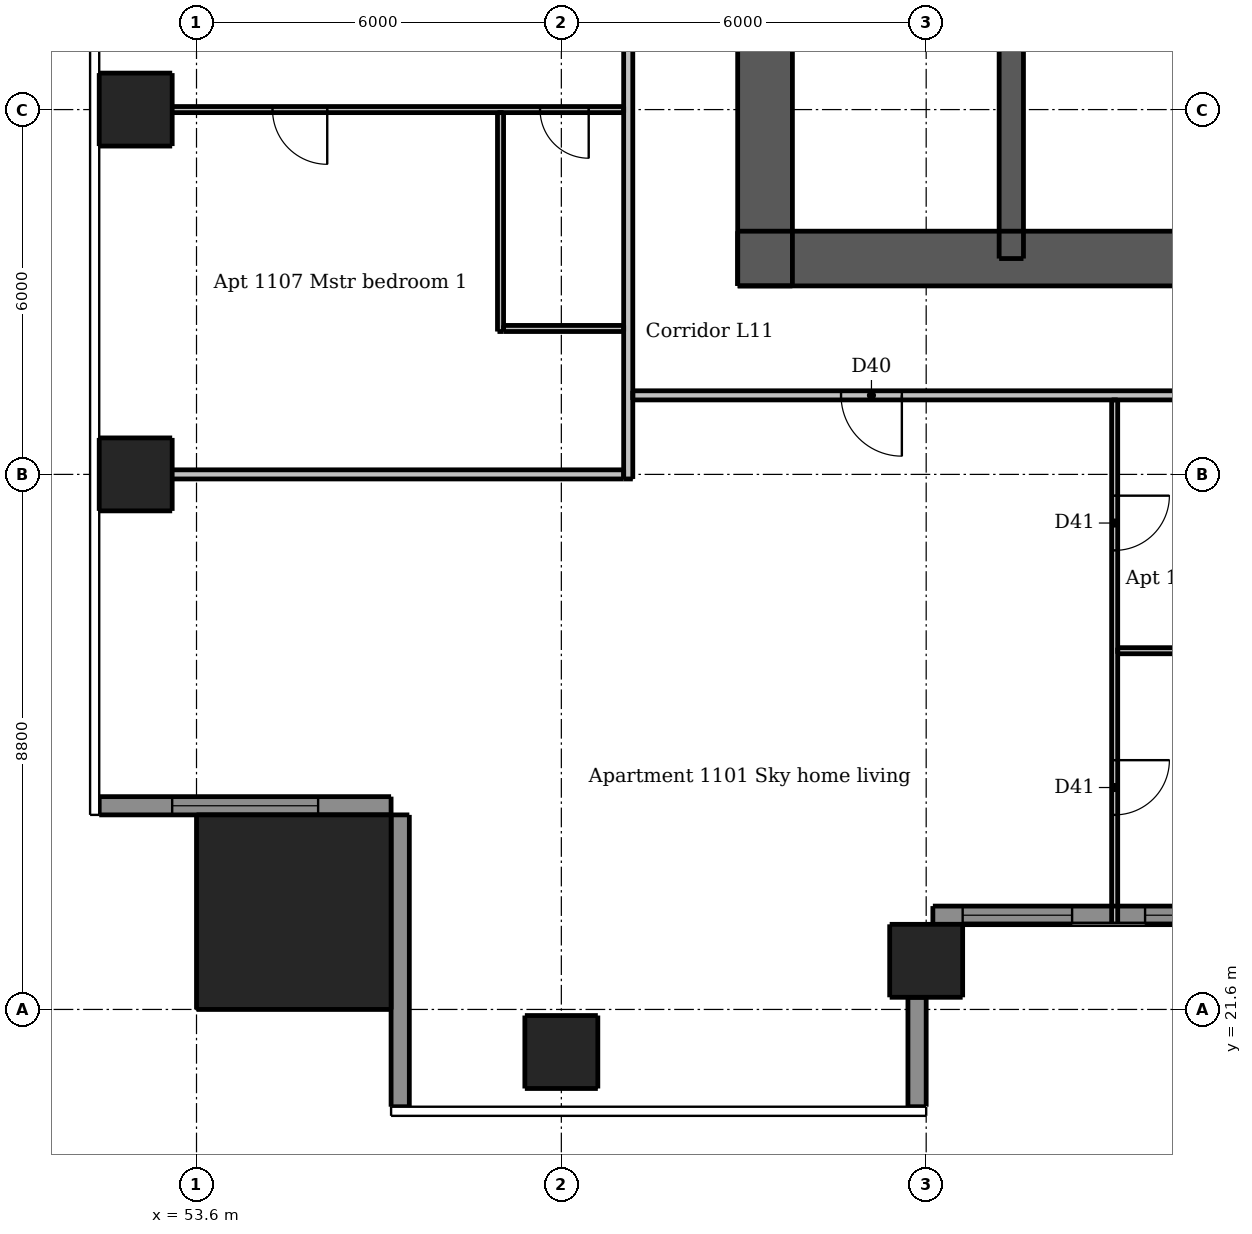
"""IFC4 building model, lengths in metres.
Left out: names, types, materials, properties, quantities, classifications, styles, units other than length and angle.
Written with IfcOpenShell. Run it as: python <this file> out.ifc"""

import sys

from ifc_helpers import new_model, si_unit, direction, frame, frame_2d, origin, origin_2d, place, context, subcontext, project, spatial, rectangle, extrude, element, fill, save


model = new_model("IFC4")
c1 = context("Model", 3, precision=1e-05, world=origin(), true_north=direction((0.0, 1.0)))
c2 = subcontext(c1, "Body", "Model", "MODEL_VIEW")
j1 = project(units=[si_unit("LENGTHUNIT", "METRE"), si_unit("PLANEANGLEUNIT", "RADIAN")], contexts=[c1])
p1 = place(None, origin())
s1 = spatial("IfcSite", under=j1, at=p1, CompositionType="ELEMENT")
p2 = place(p1, origin())
s2 = spatial("IfcBuilding", under=s1, at=p2, CompositionType="ELEMENT")
p3 = place(p2, frame((0.0, 0.0, 43.3)))
s3 = spatial("IfcBuildingStorey", under=s2, at=p3, CompositionType="ELEMENT", Elevation=43.3)
p4 = place(p3, frame((62.5, 33.95, 0.0), z_axis=(0.0, 0.0, 1.0), x_axis=(1.0, 0.0, 0.0)))
e1 = element("IfcWall", 1, at=p4, inside=s3, PredefinedType="SHEAR", context=c2, shape_type="SweptSolid", body=[
    extrude(rectangle(XDim=24.0, YDim=0.9, at=frame_2d((12.0, 0.0))), origin(), (0.0, 0.0, 1.0), 3.05),
])
p5 = place(p4, frame((2.05, 0.0, 0.0)))
e2 = element("IfcOpeningElement", 2, at=p5, cuts=e1, PredefinedType="OPENING", context=c2, shape_type="SweptSolid", body=[
    extrude(rectangle(XDim=1.1, YDim=2.1, at=frame_2d((0.55, 1.05))), frame((0.0, 0.46, 0.0), z_axis=(0.0, -1.0, 0.0), x_axis=(1.0, 0.0, 0.0)), (0.0, 0.0, 1.0), 0.92),
])
p6 = place(p4, frame((20.85, 0.0, 0.0)))
e3 = element("IfcOpeningElement", 3, at=p6, cuts=e1, PredefinedType="OPENING", context=c2, shape_type="SweptSolid", body=[
    extrude(rectangle(XDim=1.1, YDim=2.1, at=frame_2d((0.55, 1.05))), frame((0.0, 0.46, 0.0), z_axis=(0.0, -1.0, 0.0), x_axis=(1.0, 0.0, 0.0)), (0.0, 0.0, 1.0), 0.92),
])
p7 = place(p4, frame((8.0, 0.0, 0.0)))
e4 = element("IfcOpeningElement", 4, at=p7, cuts=e1, PredefinedType="OPENING", context=c2, shape_type="SweptSolid", body=[
    extrude(rectangle(XDim=1.1, YDim=2.1, at=frame_2d((0.55, 1.05))), frame((0.0, 0.46, 0.0), z_axis=(0.0, -1.0, 0.0), x_axis=(1.0, 0.0, 0.0)), (0.0, 0.0, 1.0), 0.92),
])
p8 = place(p4, frame((17.488, 0.0, 0.0)))
e5 = element("IfcOpeningElement", 5, at=p8, cuts=e1, PredefinedType="OPENING", context=c2, shape_type="SweptSolid", body=[
    extrude(rectangle(XDim=0.9, YDim=2.1, at=frame_2d((0.45, 1.05))), frame((0.0, 0.46, 0.0), z_axis=(0.0, -1.0, 0.0), x_axis=(1.0, 0.0, 0.0)), (0.0, 0.0, 1.0), 0.92),
])
p9 = place(p3, frame((62.95, 33.5, 0.0), z_axis=(0.0, 0.0, 1.0), x_axis=(0.0, 1.0, 0.0)))
e6 = element("IfcWall", 6, at=p9, inside=s3, PredefinedType="SHEAR", context=c2, shape_type="SweptSolid", body=[
    extrude(rectangle(XDim=24.0, YDim=0.9, at=frame_2d((12.0, 0.0))), origin(), (0.0, 0.0, 1.0), 3.05),
])
p10 = place(p9, frame((11.2, 0.0, 0.0)))
e7 = element("IfcOpeningElement", 7, at=p10, cuts=e6, PredefinedType="OPENING", context=c2, shape_type="SweptSolid", body=[
    extrude(rectangle(XDim=1.6, YDim=2.1, at=frame_2d((0.8, 1.05))), frame((0.0, 0.46, 0.0), z_axis=(0.0, -1.0, 0.0), x_axis=(1.0, 0.0, 0.0)), (0.0, 0.0, 1.0), 0.92),
])
p11 = place(p3, frame((67.0, 33.95, 0.0), z_axis=(0.0, 0.0, 1.0), x_axis=(0.0, 1.0, 0.0)))
e8 = element("IfcWall", 8, at=p11, inside=s3, PredefinedType="SHEAR", context=c2, shape_type="SweptSolid", body=[
    extrude(rectangle(XDim=9.95, YDim=0.4, at=frame_2d((4.975, 0.0))), origin(), (0.0, 0.0, 1.0), 3.05),
])
p12 = place(p11, frame((0.65, 0.0, 0.0)))
e9 = element("IfcOpeningElement", 9, at=p12, cuts=e8, PredefinedType="OPENING", context=c2, shape_type="SweptSolid", body=[
    extrude(rectangle(XDim=1.1, YDim=2.1, at=frame_2d((0.55, 1.05))), frame((0.0, 0.21, 0.0), z_axis=(0.0, -1.0, 0.0), x_axis=(1.0, 0.0, 0.0)), (0.0, 0.0, 1.0), 0.42),
])
for number, where, z_axis, x_axis in (
    (10, (59.6, 20.9, 0.0), (0.0, 0.0, 1.0), (1.0, 0.0, 0.0)),
    (11, (65.6, 22.4, 0.0), (0.0, 0.0, 1.0), (1.0, 0.0, 0.0)),
    (12, (52.6, 30.4, 0.0), (0.0, 0.0, 1.0), (1.0, 0.0, 0.0)),
    (13, (52.6, 36.4, 0.0), (0.0, 0.0, 1.0), (1.0, 0.0, 0.0)),
):
    element("IfcColumn", number, at=place(p3, frame(where, z_axis=z_axis, x_axis=x_axis)), inside=s3, PredefinedType="COLUMN", context=c2, shape_type="SweptSolid", body=[
        extrude(rectangle(XDim=1.2, YDim=1.2, at=origin_2d()), origin(), (0.0, 0.0, 1.0), 3.05),
    ])
p13 = place(p3, frame((55.2, 23.2, 0.0), z_axis=(0.0, 0.0, 1.0), x_axis=(1.0, 0.0, 0.0)))
e14 = element("IfcColumn", 14, at=p13, inside=s3, PredefinedType="COLUMN", context=c2, shape_type="SweptSolid", body=[
    extrude(rectangle(XDim=3.2, YDim=3.2, at=origin_2d()), origin(), (0.0, 0.0, 1.0), 3.3),
])
p14 = place(p3, frame((65.45, 20.0, 0.0), z_axis=(0.0, 0.0, 1.0), x_axis=(0.0, 1.0, 0.0)))
e15 = element("IfcWall", 15, at=p14, inside=s3, PredefinedType="SOLIDWALL", context=c2, shape_type="SweptSolid", body=[
    extrude(rectangle(XDim=1.8, YDim=0.3, at=frame_2d((0.9, 0.0))), origin(), (0.0, 0.0, 1.0), 3.05),
])
p15 = place(p3, frame((52.0, 24.95, 0.0), z_axis=(0.0, 0.0, 1.0), x_axis=(1.0, 0.0, 0.0)))
e16 = element("IfcWall", 16, at=p15, inside=s3, PredefinedType="SOLIDWALL", context=c2, shape_type="SweptSolid", body=[
    extrude(rectangle(XDim=4.8, YDim=0.3, at=frame_2d((2.4, 0.0))), origin(), (0.0, 0.0, 1.0), 3.05),
])
p16 = place(p15, frame((1.2, 0.0, 0.15)))
e17 = element("IfcOpeningElement", 17, at=p16, cuts=e16, PredefinedType="OPENING", context=c2, shape_type="SweptSolid", body=[
    extrude(rectangle(XDim=2.4, YDim=2.1, at=frame_2d((1.2, 1.05))), frame((0.0, 0.16, 0.0), z_axis=(0.0, -1.0, 0.0), x_axis=(1.0, 0.0, 0.0)), (0.0, 0.0, 1.0), 0.32),
])
p17 = place(p3, frame((56.95, 24.8, 0.0), z_axis=(0.0, 0.0, 1.0), x_axis=(0.0, -1.0, 0.0)))
e18 = element("IfcWall", 18, at=p17, inside=s3, PredefinedType="SOLIDWALL", context=c2, shape_type="SweptSolid", body=[
    extrude(rectangle(XDim=4.8, YDim=0.3, at=frame_2d((2.4, 0.0))), origin(), (0.0, 0.0, 1.0), 3.05),
])
p18 = place(p3, frame((65.71, 23.15, 0.0), z_axis=(0.0, 0.0, 1.0), x_axis=(1.0, 0.0, 0.0)))
e19 = element("IfcWall", 19, at=p18, inside=s3, PredefinedType="SOLIDWALL", context=c2, shape_type="SweptSolid", body=[
    extrude(rectangle(XDim=5.78, YDim=0.3, at=frame_2d((2.89, 0.0))), origin(), (0.0, 0.0, 1.0), 3.05),
])
p19 = place(p18, frame((0.49, 0.0, 0.15)))
e20 = element("IfcOpeningElement", 20, at=p19, cuts=e19, PredefinedType="OPENING", context=c2, shape_type="SweptSolid", body=[
    extrude(rectangle(XDim=1.8, YDim=2.1, at=frame_2d((0.9, 1.05))), frame((0.0, 0.16, 0.0), z_axis=(0.0, -1.0, 0.0), x_axis=(1.0, 0.0, 0.0)), (0.0, 0.0, 1.0), 0.32),
])
p20 = place(p18, frame((3.49, 0.0, 0.15)))
e21 = element("IfcOpeningElement", 21, at=p20, cuts=e19, PredefinedType="OPENING", context=c2, shape_type="SweptSolid", body=[
    extrude(rectangle(XDim=1.8, YDim=2.1, at=frame_2d((0.9, 1.05))), frame((0.0, 0.16, 0.0), z_axis=(0.0, -1.0, 0.0), x_axis=(1.0, 0.0, 0.0)), (0.0, 0.0, 1.0), 0.32),
])
p21 = place(p3, frame((58.6, 32.75, 0.0), z_axis=(0.0, 0.0, 1.0), x_axis=(0.0, 1.0, 0.0)))
e22 = element("IfcWall", 22, at=p21, inside=s3, PredefinedType="PARTITIONING", context=c2, shape_type="SweptSolid", body=[
    extrude(rectangle(XDim=3.6, YDim=0.1, at=frame_2d((1.8, 0.0))), origin(), (0.0, 0.0, 1.0), 3.05),
])
p22 = place(p3, frame((68.7, 31.625, 0.0), z_axis=(0.0, 0.0, 1.0), x_axis=(0.0, -1.0, 0.0)))
e23 = element("IfcWall", 23, at=p22, inside=s3, PredefinedType="PARTITIONING", context=c2, shape_type="SweptSolid", body=[
    extrude(rectangle(XDim=8.625, YDim=0.1, at=frame_2d((4.312, 0.0))), origin(), (0.0, 0.0, 1.0), 3.05),
])
p23 = place(p22, frame((1.575, 0.0, 0.0)))
e24 = element("IfcOpeningElement", 24, at=p23, cuts=e23, PredefinedType="OPENING", context=c2, shape_type="SweptSolid", body=[
    extrude(rectangle(XDim=0.9, YDim=2.1, at=frame_2d((0.45, 1.05))), frame((0.0, 0.06, 0.0), z_axis=(0.0, -1.0, 0.0), x_axis=(1.0, 0.0, 0.0)), (0.0, 0.0, 1.0), 0.12),
])
p24 = place(p22, frame((5.925, 0.0, 0.0)))
e25 = element("IfcOpeningElement", 25, at=p24, cuts=e23, PredefinedType="OPENING", context=c2, shape_type="SweptSolid", body=[
    extrude(rectangle(XDim=0.9, YDim=2.1, at=frame_2d((0.45, 1.05))), frame((0.0, 0.06, 0.0), z_axis=(0.0, -1.0, 0.0), x_axis=(1.0, 0.0, 0.0)), (0.0, 0.0, 1.0), 0.12),
])
p25 = place(p3, frame((60.625, 36.4, 0.0), z_axis=(0.0, 0.0, 1.0), x_axis=(-1.0, 0.0, 0.0)))
e26 = element("IfcWall", 26, at=p25, inside=s3, PredefinedType="PARTITIONING", context=c2, shape_type="SweptSolid", body=[
    extrude(rectangle(XDim=8.625, YDim=0.1, at=frame_2d((4.312, 0.0))), origin(), (0.0, 0.0, 1.0), 2.516),
])
p26 = place(p25, frame((4.875, 0.0, 0.0)))
e27 = element("IfcOpeningElement", 27, at=p26, cuts=e26, PredefinedType="OPENING", context=c2, shape_type="SweptSolid", body=[
    extrude(rectangle(XDim=0.9, YDim=2.1, at=frame_2d((0.45, 1.05))), frame((0.0, 0.06, 0.0), z_axis=(0.0, -1.0, 0.0), x_axis=(1.0, 0.0, 0.0)), (0.0, 0.0, 1.0), 0.12),
])
p27 = place(p25, frame((0.575, 0.0, 0.0)))
e28 = element("IfcOpeningElement", 28, at=p27, cuts=e26, PredefinedType="OPENING", context=c2, shape_type="SweptSolid", body=[
    extrude(rectangle(XDim=0.8, YDim=2.1, at=frame_2d((0.4, 1.05))), frame((0.0, 0.06, 0.0), z_axis=(0.0, -1.0, 0.0), x_axis=(1.0, 0.0, 0.0)), (0.0, 0.0, 1.0), 0.12),
])
p28 = place(p3, frame((58.65, 32.8, 0.0), z_axis=(0.0, 0.0, 1.0), x_axis=(1.0, 0.0, 0.0)))
e29 = element("IfcWall", 29, at=p28, inside=s3, PredefinedType="PARTITIONING", context=c2, shape_type="SweptSolid", body=[
    extrude(rectangle(XDim=1.975, YDim=0.1, at=frame_2d((0.988, 0.0))), origin(), (0.0, 0.0, 1.0), 3.05),
])
p29 = place(p3, frame((68.75, 27.5, 0.0), z_axis=(0.0, 0.0, 1.0), x_axis=(1.0, 0.0, 0.0)))
e30 = element("IfcWall", 30, at=p29, inside=s3, PredefinedType="PARTITIONING", context=c2, shape_type="SweptSolid", body=[
    extrude(rectangle(XDim=5.775, YDim=0.1, at=frame_2d((2.887, 0.0))), origin(), (0.0, 0.0, 1.0), 3.05),
])
p30 = place(p29, frame((3.7, 0.0, 0.0)))
e31 = element("IfcOpeningElement", 31, at=p30, cuts=e30, PredefinedType="OPENING", context=c2, shape_type="SweptSolid", body=[
    extrude(rectangle(XDim=0.8, YDim=2.1, at=frame_2d((0.4, 1.05))), frame((0.0, 0.06, 0.0), z_axis=(0.0, -1.0, 0.0), x_axis=(1.0, 0.0, 0.0)), (0.0, 0.0, 1.0), 0.12),
])
p31 = place(p3, frame((60.7, 30.325, 0.0), z_axis=(0.0, 0.0, 1.0), x_axis=(0.0, 1.0, 0.0)))
e32 = element("IfcWall", 32, at=p31, inside=s3, PredefinedType="PARTITIONING", context=c2, shape_type="SweptSolid", body=[
    extrude(rectangle(XDim=28.9, YDim=0.15, at=frame_2d((14.45, 0.0))), origin(), (0.0, 0.0, 1.0), 3.05),
])
p32 = place(p31, frame((7.375, 0.0, 0.0)))
e33 = element("IfcOpeningElement", 33, at=p32, cuts=e32, PredefinedType="OPENING", context=c2, shape_type="SweptSolid", body=[
    extrude(rectangle(XDim=1.0, YDim=2.1, at=frame_2d((0.5, 1.05))), frame((0.0, 0.085, 0.0), z_axis=(0.0, -1.0, 0.0), x_axis=(1.0, 0.0, 0.0)), (0.0, 0.0, 1.0), 0.17),
])
p33 = place(p31, frame((26.025, 0.0, 0.0)))
e34 = element("IfcOpeningElement", 34, at=p33, cuts=e32, PredefinedType="OPENING", context=c2, shape_type="SweptSolid", body=[
    extrude(rectangle(XDim=1.0, YDim=2.1, at=frame_2d((0.5, 1.05))), frame((0.0, 0.085, 0.0), z_axis=(0.0, -1.0, 0.0), x_axis=(1.0, 0.0, 0.0)), (0.0, 0.0, 1.0), 0.17),
])
p34 = place(p3, frame((89.525, 31.7, 0.0), z_axis=(0.0, 0.0, 1.0), x_axis=(-1.0, 0.0, 0.0)))
e35 = element("IfcWall", 35, at=p34, inside=s3, PredefinedType="PARTITIONING", context=c2, shape_type="SweptSolid", body=[
    extrude(rectangle(XDim=28.75, YDim=0.15, at=frame_2d((14.375, 0.0))), origin(), (0.0, 0.0, 1.0), 3.05),
])
p35 = place(p34, frame((24.325, 0.0, 0.0)))
e36 = element("IfcOpeningElement", 36, at=p35, cuts=e35, PredefinedType="OPENING", context=c2, shape_type="SweptSolid", body=[
    extrude(rectangle(XDim=1.0, YDim=2.1, at=frame_2d((0.5, 1.05))), frame((0.0, 0.085, 0.0), z_axis=(0.0, -1.0, 0.0), x_axis=(1.0, 0.0, 0.0)), (0.0, 0.0, 1.0), 0.17),
])
p36 = place(p34, frame((6.575, 0.0, 0.0)))
e37 = element("IfcOpeningElement", 37, at=p36, cuts=e35, PredefinedType="OPENING", context=c2, shape_type="SweptSolid", body=[
    extrude(rectangle(XDim=1.0, YDim=2.1, at=frame_2d((0.5, 1.05))), frame((0.0, 0.085, 0.0), z_axis=(0.0, -1.0, 0.0), x_axis=(1.0, 0.0, 0.0)), (0.0, 0.0, 1.0), 0.17),
])
p37 = place(p3, frame((52.0, 30.4, 0.0), z_axis=(0.0, 0.0, 1.0), x_axis=(1.0, 0.0, 0.0)))
e38 = element("IfcWall", 38, at=p37, inside=s3, PredefinedType="PARTITIONING", context=c2, shape_type="SweptSolid", body=[
    extrude(rectangle(XDim=8.625, YDim=0.15, at=frame_2d((4.312, 0.0))), origin(), (0.0, 0.0, 1.0), 2.647),
])
p38 = place(p16, origin())
e39 = element("IfcWindow", 39, at=p38, inside=s3, PartitioningType="DOUBLE_PANEL_VERTICAL", PredefinedType="WINDOW", context=c2, shape_type="SweptSolid", body=[
    extrude(rectangle(XDim=2.4, YDim=2.1, at=frame_2d((1.2, 1.05))), frame((0.0, 0.03, 0.0), z_axis=(0.0, -1.0, 0.0), x_axis=(1.0, 0.0, 0.0)), (0.0, 0.0, 1.0), 0.06),
])
fill(e17, e39)
p39 = place(p19, origin())
e40 = element("IfcWindow", 40, at=p39, inside=s3, PartitioningType="DOUBLE_PANEL_VERTICAL", PredefinedType="WINDOW", context=c2, shape_type="SweptSolid", body=[
    extrude(rectangle(XDim=1.8, YDim=2.1, at=frame_2d((0.9, 1.05))), frame((0.0, 0.03, 0.0), z_axis=(0.0, -1.0, 0.0), x_axis=(1.0, 0.0, 0.0)), (0.0, 0.0, 1.0), 0.06),
])
fill(e20, e40)
p40 = place(p20, origin())
e41 = element("IfcWindow", 41, at=p40, inside=s3, PartitioningType="DOUBLE_PANEL_VERTICAL", PredefinedType="WINDOW", context=c2, shape_type="SweptSolid", body=[
    extrude(rectangle(XDim=1.8, YDim=2.1, at=frame_2d((0.9, 1.05))), frame((0.0, 0.03, 0.0), z_axis=(0.0, -1.0, 0.0), x_axis=(1.0, 0.0, 0.0)), (0.0, 0.0, 1.0), 0.06),
])
fill(e21, e41)
p41 = place(p5, origin())
e42 = element("IfcDoor", 42, at=p41, inside=s3, OperationType="SINGLE_SWING_LEFT", PredefinedType="DOOR", context=c2, shape_type="SweptSolid", body=[
    extrude(rectangle(XDim=1.1, YDim=2.1, at=frame_2d((0.55, 1.05))), frame((0.0, 0.438, 0.0), z_axis=(0.0, -1.0, 0.0), x_axis=(1.0, 0.0, 0.0)), (0.0, 0.0, 1.0), 0.05),
])
fill(e2, e42)
p42 = place(p12, origin())
e43 = element("IfcDoor", 43, at=p42, inside=s3, OperationType="SINGLE_SWING_RIGHT", PredefinedType="DOOR", context=c2, shape_type="SweptSolid", body=[
    extrude(rectangle(XDim=1.1, YDim=2.1, at=frame_2d((0.55, 1.05))), frame((0.0, -0.138, 0.0), z_axis=(0.0, -1.0, 0.0), x_axis=(1.0, 0.0, 0.0)), (0.0, 0.0, 1.0), 0.05),
])
fill(e9, e43)
p43 = place(p35, origin())
e44 = element("IfcDoor", 44, at=p43, inside=s3, OperationType="SINGLE_SWING_LEFT", PredefinedType="DOOR", context=c2, shape_type="SweptSolid", body=[
    extrude(rectangle(XDim=1.0, YDim=2.1, at=frame_2d((0.5, 1.05))), frame((0.0, 0.025, 0.0), z_axis=(0.0, -1.0, 0.0), x_axis=(1.0, 0.0, 0.0)), (0.0, 0.0, 1.0), 0.05),
])
fill(e36, e44)
p44 = place(p23, origin())
e45 = element("IfcDoor", 45, at=p44, inside=s3, OperationType="SINGLE_SWING_LEFT", PredefinedType="DOOR", context=c2, shape_type="SweptSolid", body=[
    extrude(rectangle(XDim=0.9, YDim=2.1, at=frame_2d((0.45, 1.05))), frame((0.0, 0.025, 0.0), z_axis=(0.0, -1.0, 0.0), x_axis=(1.0, 0.0, 0.0)), (0.0, 0.0, 1.0), 0.05),
])
fill(e24, e45)
p45 = place(p24, origin())
e46 = element("IfcDoor", 46, at=p45, inside=s3, OperationType="SINGLE_SWING_LEFT", PredefinedType="DOOR", context=c2, shape_type="SweptSolid", body=[
    extrude(rectangle(XDim=0.9, YDim=2.1, at=frame_2d((0.45, 1.05))), frame((0.0, 0.025, 0.0), z_axis=(0.0, -1.0, 0.0), x_axis=(1.0, 0.0, 0.0)), (0.0, 0.0, 1.0), 0.05),
])
fill(e25, e46)
p46 = place(p26, origin())
e47 = element("IfcDoor", 47, at=p46, inside=s3, OperationType="SINGLE_SWING_LEFT", PredefinedType="DOOR", context=c2, shape_type="SweptSolid", body=[
    extrude(rectangle(XDim=0.9, YDim=2.1, at=frame_2d((0.45, 1.05))), frame((0.0, 0.025, 0.0), z_axis=(0.0, -1.0, 0.0), x_axis=(1.0, 0.0, 0.0)), (0.0, 0.0, 1.0), 0.05),
])
fill(e27, e47)
p47 = place(p27, origin())
e48 = element("IfcDoor", 48, at=p47, inside=s3, OperationType="SINGLE_SWING_LEFT", PredefinedType="DOOR", context=c2, shape_type="SweptSolid", body=[
    extrude(rectangle(XDim=0.8, YDim=2.1, at=frame_2d((0.4, 1.05))), frame((0.0, 0.025, 0.0), z_axis=(0.0, -1.0, 0.0), x_axis=(1.0, 0.0, 0.0)), (0.0, 0.0, 1.0), 0.05),
])
fill(e28, e48)
save(model, sys.argv[1])
